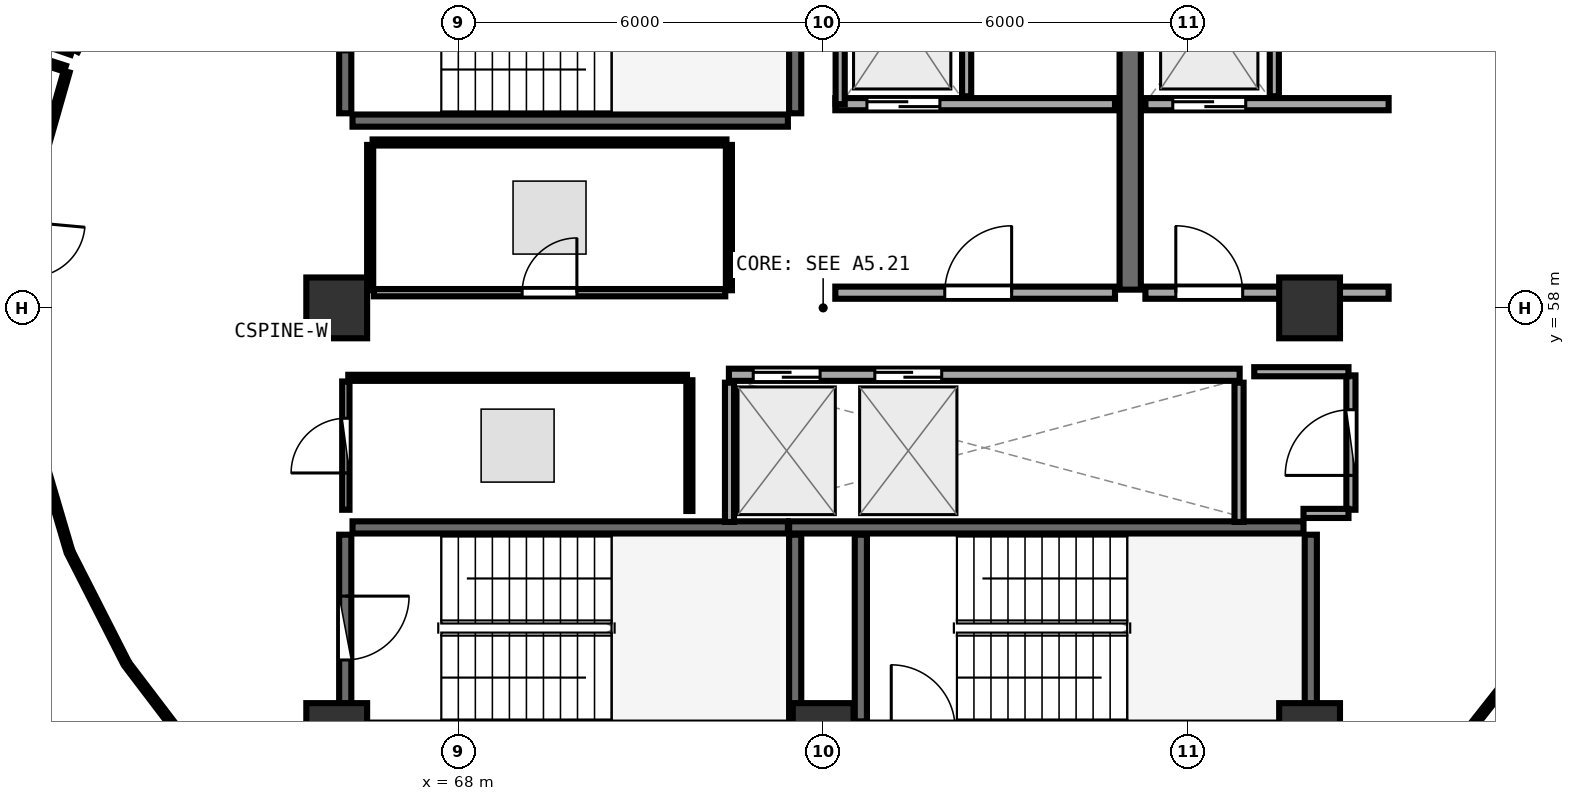
"""IFC4 building model, lengths in metres.
Left out: names, types, materials, properties, quantities, classifications, styles, units other than length and angle.
Written with IfcOpenShell. Run it as: python <this file> out.ifc"""

import sys

from ifc_helpers import new_model, si_unit, direction, frame, frame_2d, origin, origin_2d, place, context, subcontext, project, spatial, rectangle, extrude, element, fill, save


model = new_model("IFC4")
c1 = context("Model", 3, precision=1e-05, world=origin(), true_north=direction((0.0, 1.0)))
c2 = subcontext(c1, "Body", "Model", "MODEL_VIEW")
j1 = project(units=[si_unit("LENGTHUNIT", "METRE"), si_unit("PLANEANGLEUNIT", "RADIAN")], contexts=[c1])
p1 = place(None, origin())
s1 = spatial("IfcSite", under=j1, at=p1, CompositionType="ELEMENT")
p2 = place(p1, origin())
s2 = spatial("IfcBuilding", under=s1, at=p2, CompositionType="ELEMENT")
p3 = place(p2, frame((0.0, 0.0, 286.2)))
s3 = spatial("IfcBuildingStorey", under=s2, at=p3, CompositionType="ELEMENT", Elevation=286.2)
for number, where, z_axis, x_axis in (
    (1, (66.0, 51.0, 0.0), (0.0, 0.0, 1.0), (1.0, 0.0, 0.0)),
    (2, (74.0, 51.0, 0.0), (0.0, 0.0, 1.0), (1.0, 0.0, 0.0)),
    (3, (82.0, 51.0, 0.0), (0.0, 0.0, 1.0), (1.0, 0.0, 0.0)),
    (4, (82.0, 58.0, 0.0), (0.0, 0.0, 1.0), (1.0, 0.0, 0.0)),
    (5, (66.0, 58.0, 0.0), (0.0, 0.0, 1.0), (1.0, 0.0, 0.0)),
):
    element("IfcColumn", number, at=place(p3, frame(where, z_axis=z_axis, x_axis=x_axis)), inside=s3, PredefinedType="PILASTER", context=c2, shape_type="SweptSolid", body=[
        extrude(rectangle(XDim=1.0, YDim=1.0, at=origin_2d()), origin(), (0.0, 0.0, 1.0), 3.75),
    ])
p4 = place(p3, frame((66.26, 61.08, 0.0), z_axis=(0.0, 0.0, 1.0), x_axis=(1.0, 0.0, 0.0)))
e6 = element("IfcWall", 6, at=p4, inside=s3, PredefinedType="SHEAR", context=c2, shape_type="SweptSolid", body=[
    extrude(rectangle(XDim=7.16, YDim=0.2, at=frame_2d((3.58, 0.0))), origin(), (0.0, 0.0, 1.0), 3.49),
])
p5 = place(p3, frame((73.54, 61.2, 0.0), z_axis=(0.0, 0.0, 1.0), x_axis=(0.0, 1.0, 0.0)))
e7 = element("IfcWall", 7, at=p5, inside=s3, PredefinedType="SHEAR", context=c2, shape_type="SweptSolid", body=[
    extrude(rectangle(XDim=3.07, YDim=0.2, at=frame_2d((1.535, 0.0))), origin(), (0.0, 0.0, 1.0), 3.49),
])
p6 = place(p3, frame((66.14, 64.27, 0.0), z_axis=(0.0, 0.0, 1.0), x_axis=(0.0, -1.0, 0.0)))
e8 = element("IfcWall", 8, at=p6, inside=s3, PredefinedType="SHEAR", context=c2, shape_type="SweptSolid", body=[
    extrude(rectangle(XDim=3.07, YDim=0.2, at=frame_2d((1.535, 0.0))), origin(), (0.0, 0.0, 1.0), 3.49),
])
p7 = place(p6, frame((1.01, 0.0, 0.0)))
e9 = element("IfcOpeningElement", 9, at=p7, cuts=e8, PredefinedType="OPENING", context=c2, shape_type="SweptSolid", body=[
    extrude(rectangle(XDim=1.05, YDim=2.1, at=frame_2d((0.525, 1.05))), frame((0.0, 0.11, 0.0), z_axis=(0.0, -1.0, 0.0), x_axis=(1.0, 0.0, 0.0)), (0.0, 0.0, 1.0), 0.22),
])
p8 = place(p3, frame((82.02, 51.2, 0.0), z_axis=(0.0, 0.0, 1.0), x_axis=(0.0, 1.0, 0.0)))
e10 = element("IfcWall", 10, at=p8, inside=s3, PredefinedType="SHEAR", context=c2, shape_type="SweptSolid", body=[
    extrude(rectangle(XDim=3.07, YDim=0.2, at=frame_2d((1.535, 0.0))), origin(), (0.0, 0.0, 1.0), 3.49),
])
p9 = place(p3, frame((81.9, 54.39, 0.0), z_axis=(0.0, 0.0, 1.0), x_axis=(-1.0, 0.0, 0.0)))
e11 = element("IfcWall", 11, at=p9, inside=s3, PredefinedType="SHEAR", context=c2, shape_type="SweptSolid", body=[
    extrude(rectangle(XDim=8.46, YDim=0.2, at=frame_2d((4.23, 0.0))), origin(), (0.0, 0.0, 1.0), 3.49),
])
for number, where, z_axis, x_axis in (
    (12, (74.62, 54.27, 0.0), (0.0, 0.0, 1.0), (0.0, -1.0, 0.0)),
    (13, (73.54, 51.2, 0.0), (0.0, 0.0, 1.0), (0.0, 1.0, 0.0)),
):
    element("IfcWall", number, at=place(p3, frame(where, z_axis=z_axis, x_axis=x_axis)), inside=s3, PredefinedType="SHEAR", context=c2, shape_type="SweptSolid", body=[
        extrude(rectangle(XDim=3.07, YDim=0.2, at=frame_2d((1.535, 0.0))), origin(), (0.0, 0.0, 1.0), 3.49),
    ])
p10 = place(p3, frame((73.42, 54.39, 0.0), z_axis=(0.0, 0.0, 1.0), x_axis=(-1.0, 0.0, 0.0)))
e14 = element("IfcWall", 14, at=p10, inside=s3, PredefinedType="SHEAR", context=c2, shape_type="SweptSolid", body=[
    extrude(rectangle(XDim=7.16, YDim=0.2, at=frame_2d((3.58, 0.0))), origin(), (0.0, 0.0, 1.0), 3.49),
])
p11 = place(p3, frame((66.14, 54.27, 0.0), z_axis=(0.0, 0.0, 1.0), x_axis=(0.0, -1.0, 0.0)))
e15 = element("IfcWall", 15, at=p11, inside=s3, PredefinedType="SHEAR", context=c2, shape_type="SweptSolid", body=[
    extrude(rectangle(XDim=3.07, YDim=0.2, at=frame_2d((1.535, 0.0))), origin(), (0.0, 0.0, 1.0), 3.49),
])
p12 = place(p11, frame((1.01, 0.0, 0.0)))
e16 = element("IfcOpeningElement", 16, at=p12, cuts=e15, PredefinedType="OPENING", context=c2, shape_type="SweptSolid", body=[
    extrude(rectangle(XDim=1.05, YDim=2.1, at=frame_2d((0.525, 1.05))), frame((0.0, 0.11, 0.0), z_axis=(0.0, -1.0, 0.0), x_axis=(1.0, 0.0, 0.0)), (0.0, 0.0, 1.0), 0.22),
])
p13 = place(p3, frame((79.05, 58.3, 0.0), z_axis=(0.0, 0.0, 1.0), x_axis=(0.0, 1.0, 0.0)))
e17 = element("IfcWall", 17, at=p13, inside=s3, PredefinedType="SHEAR", context=c2, shape_type="SweptSolid", body=[
    extrude(rectangle(XDim=6.3, YDim=0.35, at=frame_2d((3.15, 0.0))), origin(), (0.0, 0.0, 1.0), 3.49),
])
p14 = place(p3, frame((74.2, 61.35, 0.0), z_axis=(0.0, 0.0, 1.0), x_axis=(1.0, 0.0, 0.0)))
e18 = element("IfcWall", 18, at=p14, inside=s3, PredefinedType="SOLIDWALL", context=c2, shape_type="SweptSolid", body=[
    extrude(rectangle(XDim=4.6, YDim=0.2, at=frame_2d((2.3, 0.0))), origin(), (0.0, 0.0, 1.0), 3.48),
])
p15 = place(p14, frame((0.52, 0.0, 0.0)))
e19 = element("IfcOpeningElement", 19, at=p15, cuts=e18, PredefinedType="OPENING", context=c2, shape_type="SweptSolid", body=[
    extrude(rectangle(XDim=1.2, YDim=2.15, at=frame_2d((0.6, 1.075))), frame((0.0, 0.11, 0.0), z_axis=(0.0, -1.0, 0.0), x_axis=(1.0, 0.0, 0.0)), (0.0, 0.0, 1.0), 0.22),
])
p16 = place(p3, frame((74.28, 61.35, 0.0), z_axis=(0.0, 0.0, 1.0), x_axis=(0.0, 1.0, 0.0)))
e20 = element("IfcWall", 20, at=p16, inside=s3, PredefinedType="PARTITIONING", context=c2, shape_type="SweptSolid", body=[
    extrude(rectangle(XDim=2.97, YDim=0.15, at=frame_2d((1.485, 0.0))), origin(), (0.0, 0.0, 1.0), 3.48),
])
p17 = place(p3, frame((76.36, 61.48, 0.0), z_axis=(0.0, 0.0, 1.0), x_axis=(0.0, 1.0, 0.0)))
e21 = element("IfcWall", 21, at=p17, inside=s3, PredefinedType="PARTITIONING", context=c2, shape_type="SweptSolid", body=[
    extrude(rectangle(XDim=2.84, YDim=0.15, at=frame_2d((1.42, 0.0))), origin(), (0.0, 0.0, 1.0), 3.48),
])
p18 = place(p3, frame((79.3, 61.35, 0.0), z_axis=(0.0, 0.0, 1.0), x_axis=(1.0, 0.0, 0.0)))
e22 = element("IfcWall", 22, at=p18, inside=s3, PredefinedType="SOLIDWALL", context=c2, shape_type="SweptSolid", body=[
    extrude(rectangle(XDim=4.0, YDim=0.2, at=frame_2d((2.0, 0.0))), origin(), (0.0, 0.0, 1.0), 2.775),
])
p19 = place(p18, frame((0.45, 0.0, 0.0)))
e23 = element("IfcOpeningElement", 23, at=p19, cuts=e22, PredefinedType="OPENING", context=c2, shape_type="SweptSolid", body=[
    extrude(rectangle(XDim=1.2, YDim=2.15, at=frame_2d((0.6, 1.075))), frame((0.0, 0.11, 0.0), z_axis=(0.0, -1.0, 0.0), x_axis=(1.0, 0.0, 0.0)), (0.0, 0.0, 1.0), 0.22),
])
p20 = place(p3, frame((81.42, 61.48, 0.0), z_axis=(0.0, 0.0, 1.0), x_axis=(0.0, 1.0, 0.0)))
e24 = element("IfcWall", 24, at=p20, inside=s3, PredefinedType="PARTITIONING", context=c2, shape_type="SweptSolid", body=[
    extrude(rectangle(XDim=2.84, YDim=0.15, at=frame_2d((1.42, 0.0))), origin(), (0.0, 0.0, 1.0), 3.48),
])
p21 = place(p3, frame((74.2, 58.25, 0.0), z_axis=(0.0, 0.0, 1.0), x_axis=(1.0, 0.0, 0.0)))
e25 = element("IfcWall", 25, at=p21, inside=s3, PredefinedType="SOLIDWALL", context=c2, shape_type="SweptSolid", body=[
    extrude(rectangle(XDim=4.6, YDim=0.2, at=frame_2d((2.3, 0.0))), origin(), (0.0, 0.0, 1.0), 3.48),
])
p22 = place(p21, frame((1.8, 0.0, 0.0)))
e26 = element("IfcOpeningElement", 26, at=p22, cuts=e25, PredefinedType="OPENING", context=c2, shape_type="SweptSolid", body=[
    extrude(rectangle(XDim=1.1, YDim=2.1, at=frame_2d((0.55, 1.05))), frame((0.0, 0.11, 0.0), z_axis=(0.0, -1.0, 0.0), x_axis=(1.0, 0.0, 0.0)), (0.0, 0.0, 1.0), 0.22),
])
p23 = place(p3, frame((79.3, 58.25, 0.0), z_axis=(0.0, 0.0, 1.0), x_axis=(1.0, 0.0, 0.0)))
e27 = element("IfcWall", 27, at=p23, inside=s3, PredefinedType="SOLIDWALL", context=c2, shape_type="SweptSolid", body=[
    extrude(rectangle(XDim=4.0, YDim=0.2, at=frame_2d((2.0, 0.0))), origin(), (0.0, 0.0, 1.0), 2.775),
])
p24 = place(p23, frame((0.5, 0.0, 0.0)))
e28 = element("IfcOpeningElement", 28, at=p24, cuts=e27, PredefinedType="OPENING", context=c2, shape_type="SweptSolid", body=[
    extrude(rectangle(XDim=1.1, YDim=2.1, at=frame_2d((0.55, 1.05))), frame((0.0, 0.11, 0.0), z_axis=(0.0, -1.0, 0.0), x_axis=(1.0, 0.0, 0.0)), (0.0, 0.0, 1.0), 0.22),
])
p25 = place(p3, frame((72.45, 56.9, 0.0), z_axis=(0.0, 0.0, 1.0), x_axis=(1.0, 0.0, 0.0)))
e29 = element("IfcWall", 29, at=p25, inside=s3, PredefinedType="SOLIDWALL", context=c2, shape_type="SweptSolid", body=[
    extrude(rectangle(XDim=8.4, YDim=0.2, at=frame_2d((4.2, 0.0))), origin(), (0.0, 0.0, 1.0), 3.48),
])
p26 = place(p25, frame((0.4, 0.0, 0.0)))
e30 = element("IfcOpeningElement", 30, at=p26, cuts=e29, PredefinedType="OPENING", context=c2, shape_type="SweptSolid", body=[
    extrude(rectangle(XDim=1.1, YDim=2.1, at=frame_2d((0.55, 1.05))), frame((0.0, 0.11, 0.0), z_axis=(0.0, -1.0, 0.0), x_axis=(1.0, 0.0, 0.0)), (0.0, 0.0, 1.0), 0.22),
])
p27 = place(p25, frame((2.4, 0.0, 0.0)))
e31 = element("IfcOpeningElement", 31, at=p27, cuts=e29, PredefinedType="OPENING", context=c2, shape_type="SweptSolid", body=[
    extrude(rectangle(XDim=1.1, YDim=2.1, at=frame_2d((0.55, 1.05))), frame((0.0, 0.11, 0.0), z_axis=(0.0, -1.0, 0.0), x_axis=(1.0, 0.0, 0.0)), (0.0, 0.0, 1.0), 0.22),
])
for number, where, z_axis, x_axis in (
    (32, (72.46, 54.48, 0.0), (0.0, 0.0, 1.0), (0.0, 1.0, 0.0)),
    (33, (80.84, 54.48, 0.0), (0.0, 0.0, 1.0), (0.0, 1.0, 0.0)),
):
    element("IfcWall", number, at=place(p3, frame(where, z_axis=z_axis, x_axis=x_axis)), inside=s3, PredefinedType="PARTITIONING", context=c2, shape_type="SweptSolid", body=[
        extrude(rectangle(XDim=2.29, YDim=0.15, at=frame_2d((1.145, 0.0))), origin(), (0.0, 0.0, 1.0), 3.48),
    ])
p28 = place(p3, frame((82.68, 54.68, 0.0), z_axis=(0.0, 0.0, 1.0), x_axis=(0.0, 1.0, 0.0)))
e34 = element("IfcWall", 34, at=p28, inside=s3, PredefinedType="PARTITIONING", context=c2, shape_type="SweptSolid", body=[
    extrude(rectangle(XDim=2.21, YDim=0.15, at=frame_2d((1.105, 0.0))), origin(), (0.0, 0.0, 1.0), 3.48),
])
p29 = place(p28, frame((0.565, 0.0, 0.0)))
e35 = element("IfcOpeningElement", 35, at=p29, cuts=e34, PredefinedType="OPENING", context=c2, shape_type="SweptSolid", body=[
    extrude(rectangle(XDim=1.08, YDim=2.1, at=frame_2d((0.54, 1.05))), frame((0.0, 0.085, 0.0), z_axis=(0.0, -1.0, 0.0), x_axis=(1.0, 0.0, 0.0)), (0.0, 0.0, 1.0), 0.17),
])
p30 = place(p3, frame((66.61, 58.25, 0.0), z_axis=(0.0, 0.0, 1.0), x_axis=(1.0, 0.0, 0.0)))
e36 = element("IfcWall", 36, at=p30, inside=s3, PredefinedType="PARTITIONING", context=c2, shape_type="SweptSolid", body=[
    extrude(rectangle(XDim=5.78, YDim=0.12, at=frame_2d((2.89, 0.0))), origin(), (0.0, 0.0, 1.0), 3.48),
])
p31 = place(p30, frame((2.44, 0.0, 0.0)))
e37 = element("IfcOpeningElement", 37, at=p31, cuts=e36, PredefinedType="OPENING", context=c2, shape_type="SweptSolid", body=[
    extrude(rectangle(XDim=0.9, YDim=2.08, at=frame_2d((0.45, 1.04))), frame((0.0, 0.07, 0.0), z_axis=(0.0, -1.0, 0.0), x_axis=(1.0, 0.0, 0.0)), (0.0, 0.0, 1.0), 0.14),
])
p32 = place(p3, frame((66.15, 54.68, 0.0), z_axis=(0.0, 0.0, 1.0), x_axis=(0.0, 1.0, 0.0)))
e38 = element("IfcWall", 38, at=p32, inside=s3, PredefinedType="PARTITIONING", context=c2, shape_type="SweptSolid", body=[
    extrude(rectangle(XDim=2.11, YDim=0.12, at=frame_2d((1.055, 0.0))), origin(), (0.0, 0.0, 1.0), 2.775),
])
p33 = place(p32, frame((0.605, 0.0, 0.0)))
e39 = element("IfcOpeningElement", 39, at=p33, cuts=e38, PredefinedType="OPENING", context=c2, shape_type="SweptSolid", body=[
    extrude(rectangle(XDim=0.9, YDim=2.08, at=frame_2d((0.45, 1.04))), frame((0.0, 0.07, 0.0), z_axis=(0.0, -1.0, 0.0), x_axis=(1.0, 0.0, 0.0)), (0.0, 0.0, 1.0), 0.14),
])
p34 = place(p3, frame((81.9, 54.62, 0.0), z_axis=(0.0, 0.0, 1.0), x_axis=(1.0, 0.0, 0.0)))
e40 = element("IfcWall", 40, at=p34, inside=s3, PredefinedType="PARTITIONING", context=c2, shape_type="SweptSolid", body=[
    extrude(rectangle(XDim=0.74, YDim=0.15, at=frame_2d((0.37, 0.0))), origin(), (0.0, 0.0, 1.0), 2.775),
])
p35 = place(p3, frame((82.64, 56.95, 0.0), z_axis=(0.0, 0.0, 1.0), x_axis=(-1.0, 0.0, 0.0)))
e41 = element("IfcWall", 41, at=p35, inside=s3, PredefinedType="PARTITIONING", context=c2, shape_type="SweptSolid", body=[
    extrude(rectangle(XDim=1.55, YDim=0.15, at=frame_2d((0.775, 0.0))), origin(), (0.0, 0.0, 1.0), 2.775),
])
p36 = place(p3, frame((72.45, 58.29, 0.0), z_axis=(0.0, 0.0, 1.0), x_axis=(0.0, 1.0, 0.0)))
e42 = element("IfcWall", 42, at=p36, inside=s3, PredefinedType="PARTITIONING", context=c2, shape_type="SweptSolid", body=[
    extrude(rectangle(XDim=2.39, YDim=0.1, at=frame_2d((1.195, 0.0))), origin(), (0.0, 0.0, 1.0), 3.48),
])
p37 = place(p3, frame((72.41, 60.72, 0.0), z_axis=(0.0, 0.0, 1.0), x_axis=(-1.0, 0.0, 0.0)))
e43 = element("IfcWall", 43, at=p37, inside=s3, PredefinedType="PARTITIONING", context=c2, shape_type="SweptSolid", body=[
    extrude(rectangle(XDim=5.82, YDim=0.1, at=frame_2d((2.91, 0.0))), origin(), (0.0, 0.0, 1.0), 3.48),
])
p38 = place(p3, frame((66.55, 60.68, 0.0), z_axis=(0.0, 0.0, 1.0), x_axis=(0.0, -1.0, 0.0)))
e44 = element("IfcWall", 44, at=p38, inside=s3, PredefinedType="PARTITIONING", context=c2, shape_type="SweptSolid", body=[
    extrude(rectangle(XDim=2.39, YDim=0.1, at=frame_2d((1.195, 0.0))), origin(), (0.0, 0.0, 1.0), 3.48),
])
p39 = place(p3, frame((71.8, 54.66, 0.0), z_axis=(0.0, 0.0, 1.0), x_axis=(0.0, 1.0, 0.0)))
e45 = element("IfcWall", 45, at=p39, inside=s3, PredefinedType="PARTITIONING", context=c2, shape_type="SweptSolid", body=[
    extrude(rectangle(XDim=2.15, YDim=0.1, at=frame_2d((1.075, 0.0))), origin(), (0.0, 0.0, 1.0), 3.48),
])
p40 = place(p3, frame((71.76, 56.85, 0.0), z_axis=(0.0, 0.0, 1.0), x_axis=(-1.0, 0.0, 0.0)))
e46 = element("IfcWall", 46, at=p40, inside=s3, PredefinedType="PARTITIONING", context=c2, shape_type="SweptSolid", body=[
    extrude(rectangle(XDim=5.57, YDim=0.1, at=frame_2d((2.785, 0.0))), origin(), (0.0, 0.0, 1.0), 2.775),
])
p41 = place(p3, frame((61.642, 62.209, 0.0), z_axis=(0.0, 0.0, 1.0), x_axis=(-0.945103281494, 0.326771766388, 0.0)))
e47 = element("IfcWall", 47, at=p41, inside=s3, PredefinedType="PARTITIONING", context=c2, shape_type="SweptSolid", body=[
    extrude(rectangle(XDim=4.604, YDim=0.1, at=frame_2d((2.302, 0.0))), origin(), (0.0, 0.0, 1.0), 3.075),
])
p42 = place(p3, frame((61.559, 61.885, 0.0), z_axis=(0.0, 0.0, 1.0), x_axis=(-0.274226302341, -0.961665188673, 0.0)))
e48 = element("IfcWall", 48, at=p42, inside=s3, PredefinedType="PARTITIONING", context=c2, shape_type="SweptSolid", body=[
    extrude(rectangle(XDim=1.955, YDim=0.1, at=frame_2d((0.978, 0.0))), origin(), (0.0, 0.0, 1.0), 3.48),
])
p43 = place(p3, frame((61.041, 55.901, 0.0), z_axis=(0.0, 0.0, 1.0), x_axis=(0.28293653612, -0.959138632591, 0.0)))
e49 = element("IfcWall", 49, at=p43, inside=s3, PredefinedType="PARTITIONING", context=c2, shape_type="SweptSolid", body=[
    extrude(rectangle(XDim=1.956, YDim=0.1, at=frame_2d((0.978, 0.0))), origin(), (0.0, 0.0, 1.0), 3.48),
])
p44 = place(p3, frame((61.624, 53.95, 0.0), z_axis=(0.0, 0.0, 1.0), x_axis=(0.453658133306, -0.891175795276, 0.0)))
e50 = element("IfcWall", 50, at=p44, inside=s3, PredefinedType="PARTITIONING", context=c2, shape_type="SweptSolid", body=[
    extrude(rectangle(XDim=1.981, YDim=0.1, at=frame_2d((0.991, 0.0))), origin(), (0.0, 0.0, 1.0), 3.235),
])
p45 = place(p3, frame((62.565, 52.117, 0.0), z_axis=(0.0, 0.0, 1.0), x_axis=(0.605473441765, -0.795865510823, 0.0)))
e51 = element("IfcWall", 51, at=p45, inside=s3, PredefinedType="PARTITIONING", context=c2, shape_type="SweptSolid", body=[
    extrude(rectangle(XDim=2.014, YDim=0.1, at=frame_2d((1.007, 0.0))), origin(), (0.0, 0.0, 1.0), 3.075),
])
p46 = place(p3, frame((57.184, 63.329, 0.0), z_axis=(0.0, 0.0, 1.0), x_axis=(0.95227750557, -0.305233602976, 0.0)))
e52 = element("IfcWall", 52, at=p46, inside=s3, PredefinedType="PARTITIONING", context=c2, shape_type="SweptSolid", body=[
    extrude(rectangle(XDim=4.565, YDim=0.1, at=frame_2d((2.283, 0.0))), origin(), (0.0, 0.0, 1.0), 3.175),
])
p47 = place(p3, frame((84.079, 50.365, 0.0), z_axis=(0.0, 0.0, 1.0), x_axis=(0.618820199788, 0.785532660259, 0.0)))
e53 = element("IfcWall", 53, at=p47, inside=s3, PredefinedType="PARTITIONING", context=c2, shape_type="SweptSolid", body=[
    extrude(rectangle(XDim=2.018, YDim=0.1, at=frame_2d((1.009, 0.0))), origin(), (0.0, 0.0, 1.0), 3.075),
])
p48 = place(p12, origin())
e54 = element("IfcDoor", 54, at=p48, inside=s3, OperationType="SINGLE_SWING_LEFT", PredefinedType="DOOR", context=c2, shape_type="SweptSolid", body=[
    extrude(rectangle(XDim=1.05, YDim=2.1, at=frame_2d((0.525, 1.05))), frame((0.0, 0.025, 0.0), z_axis=(0.0, -1.0, 0.0), x_axis=(1.0, 0.0, 0.0)), (0.0, 0.0, 1.0), 0.05),
])
fill(e16, e54)
p49 = place(p15, origin())
e55 = element("IfcDoor", 55, at=p49, inside=s3, OperationType="DOUBLE_DOOR_SLIDING", PredefinedType="DOOR", context=c2, shape_type="SweptSolid", body=[
    extrude(rectangle(XDim=1.2, YDim=2.15, at=frame_2d((0.6, 1.075))), frame((0.0, 0.025, 0.0), z_axis=(0.0, -1.0, 0.0), x_axis=(1.0, 0.0, 0.0)), (0.0, 0.0, 1.0), 0.05),
])
fill(e19, e55)
p50 = place(p19, origin())
e56 = element("IfcDoor", 56, at=p50, inside=s3, OperationType="DOUBLE_DOOR_SLIDING", PredefinedType="DOOR", context=c2, shape_type="SweptSolid", body=[
    extrude(rectangle(XDim=1.2, YDim=2.15, at=frame_2d((0.6, 1.075))), frame((0.0, 0.025, 0.0), z_axis=(0.0, -1.0, 0.0), x_axis=(1.0, 0.0, 0.0)), (0.0, 0.0, 1.0), 0.05),
])
fill(e23, e56)
p51 = place(p22, frame((1.1, 0.0, 0.0), z_axis=(0.0, 0.0, 1.0), x_axis=(-1.0, 0.0, 0.0)))
e57 = element("IfcDoor", 57, at=p51, inside=s3, OperationType="SINGLE_SWING_LEFT", PredefinedType="DOOR", context=c2, shape_type="SweptSolid", body=[
    extrude(rectangle(XDim=1.1, YDim=2.1, at=frame_2d((0.55, 1.05))), frame((0.0, 0.025, 0.0), z_axis=(0.0, -1.0, 0.0), x_axis=(1.0, 0.0, 0.0)), (0.0, 0.0, 1.0), 0.05),
])
fill(e26, e57)
p52 = place(p24, frame((1.1, 0.0, 0.0), z_axis=(0.0, 0.0, 1.0), x_axis=(-1.0, 0.0, 0.0)))
e58 = element("IfcDoor", 58, at=p52, inside=s3, OperationType="SINGLE_SWING_RIGHT", PredefinedType="DOOR", context=c2, shape_type="SweptSolid", body=[
    extrude(rectangle(XDim=1.1, YDim=2.1, at=frame_2d((0.55, 1.05))), frame((0.0, 0.025, 0.0), z_axis=(0.0, -1.0, 0.0), x_axis=(1.0, 0.0, 0.0)), (0.0, 0.0, 1.0), 0.05),
])
fill(e28, e58)
p53 = place(p26, origin())
e59 = element("IfcDoor", 59, at=p53, inside=s3, OperationType="DOUBLE_DOOR_SLIDING", PredefinedType="DOOR", context=c2, shape_type="SweptSolid", body=[
    extrude(rectangle(XDim=1.1, YDim=2.1, at=frame_2d((0.55, 1.05))), frame((0.0, 0.025, 0.0), z_axis=(0.0, -1.0, 0.0), x_axis=(1.0, 0.0, 0.0)), (0.0, 0.0, 1.0), 0.05),
])
fill(e30, e59)
p54 = place(p27, origin())
e60 = element("IfcDoor", 60, at=p54, inside=s3, OperationType="DOUBLE_DOOR_SLIDING", PredefinedType="DOOR", context=c2, shape_type="SweptSolid", body=[
    extrude(rectangle(XDim=1.1, YDim=2.1, at=frame_2d((0.55, 1.05))), frame((0.0, 0.025, 0.0), z_axis=(0.0, -1.0, 0.0), x_axis=(1.0, 0.0, 0.0)), (0.0, 0.0, 1.0), 0.05),
])
fill(e31, e60)
p55 = place(p29, origin())
e61 = element("IfcDoor", 61, at=p55, inside=s3, OperationType="SINGLE_SWING_LEFT", PredefinedType="DOOR", context=c2, shape_type="SweptSolid", body=[
    extrude(rectangle(XDim=1.08, YDim=2.1, at=frame_2d((0.54, 1.05))), frame((0.0, 0.025, 0.0), z_axis=(0.0, -1.0, 0.0), x_axis=(1.0, 0.0, 0.0)), (0.0, 0.0, 1.0), 0.05),
])
fill(e35, e61)
p56 = place(p31, origin())
e62 = element("IfcDoor", 62, at=p56, inside=s3, OperationType="SINGLE_SWING_RIGHT", PredefinedType="DOOR", context=c2, shape_type="SweptSolid", body=[
    extrude(rectangle(XDim=0.9, YDim=2.08, at=frame_2d((0.45, 1.04))), frame((0.0, 0.025, 0.0), z_axis=(0.0, -1.0, 0.0), x_axis=(1.0, 0.0, 0.0)), (0.0, 0.0, 1.0), 0.05),
])
fill(e37, e62)
p57 = place(p33, origin())
e63 = element("IfcDoor", 63, at=p57, inside=s3, OperationType="SINGLE_SWING_LEFT", PredefinedType="DOOR", context=c2, shape_type="SweptSolid", body=[
    extrude(rectangle(XDim=0.9, YDim=2.08, at=frame_2d((0.45, 1.04))), frame((0.0, 0.025, 0.0), z_axis=(0.0, -1.0, 0.0), x_axis=(1.0, 0.0, 0.0)), (0.0, 0.0, 1.0), 0.05),
])
fill(e39, e63)
save(model, sys.argv[1])
